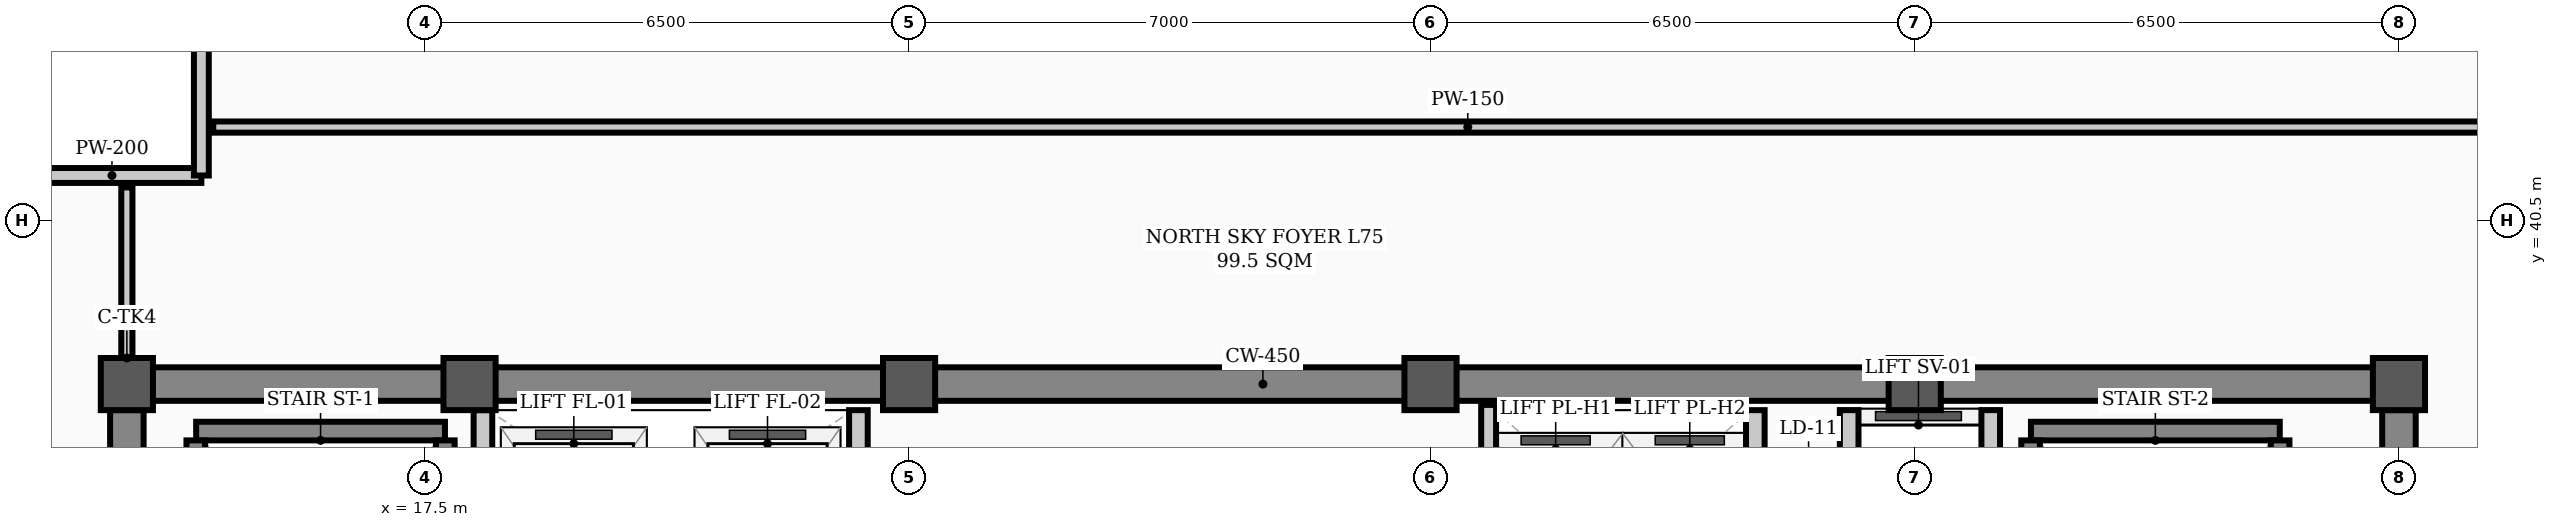
"""IFC4 building model, lengths in metres.
Left out: names, types, materials, properties, quantities, classifications, styles, units other than length and angle.
Written with IfcOpenShell. Run it as: python <this file> out.ifc"""

import sys

from ifc_helpers import new_model, si_unit, direction, frame, frame_2d, origin, origin_2d, place, context, subcontext, project, spatial, rectangle, hollow_rectangle, extrude, element, save


model = new_model("IFC4")
c1 = context("Model", 3, precision=1e-05, world=origin(), true_north=direction((0.0, 1.0)))
c2 = subcontext(c1, "Body", "Model", "MODEL_VIEW")
j1 = project(units=[si_unit("LENGTHUNIT", "METRE"), si_unit("PLANEANGLEUNIT", "RADIAN")], contexts=[c1])
p1 = place(None, origin())
s1 = spatial("IfcSite", under=j1, at=p1, CompositionType="ELEMENT")
p2 = place(p1, origin())
s2 = spatial("IfcBuilding", under=s1, at=p2, CompositionType="ELEMENT")
p3 = place(p2, frame((0.0, 0.0, 300.8)))
s3 = spatial("IfcBuildingStorey", under=s2, at=p3, CompositionType="ELEMENT", Elevation=300.8)
for number, where, z_axis, x_axis in (
    (1, (13.5, 38.3, 0.0), (0.0, 0.0, 1.0), (1.0, 0.0, 0.0)),
    (2, (18.1, 38.3, 0.0), (0.0, 0.0, 1.0), (1.0, 0.0, 0.0)),
    (3, (24.0, 38.3, 0.0), (0.0, 0.0, 1.0), (1.0, 0.0, 0.0)),
    (4, (31.0, 38.3, 0.0), (0.0, 0.0, 1.0), (1.0, 0.0, 0.0)),
    (5, (37.5, 38.3, 0.0), (0.0, 0.0, 1.0), (1.0, 0.0, 0.0)),
    (6, (44.0, 38.3, 0.0), (0.0, 0.0, 1.0), (1.0, 0.0, 0.0)),
):
    element("IfcColumn", number, at=place(p3, frame(where, z_axis=z_axis, x_axis=x_axis)), inside=s3, PredefinedType="COLUMN", context=c2, shape_type="SweptSolid", body=[
        extrude(hollow_rectangle(XDim=0.7, YDim=0.7, WallThickness=0.028, InnerFilletRadius=0.014, OuterFilletRadius=0.042, at=origin_2d()), origin(), (0.0, 0.0, 1.0), 5.2),
    ])
for number, where, z_axis, x_axis in (
    (7, (12.1, 41.1, 0.0), (0.0, 0.0, 1.0), (1.0, 0.0, 0.0)),
    (8, (14.5, 41.1, 0.0), (0.0, 0.0, 1.0), (0.0, 1.0, 0.0)),
):
    element("IfcWall", number, at=place(p3, frame(where, z_axis=z_axis, x_axis=x_axis)), inside=s3, PredefinedType="PARAPET", context=c2, shape_type="SweptSolid", body=[
        extrude(rectangle(XDim=2.4, YDim=0.2, at=frame_2d((1.2, 0.0))), origin(), (0.0, 0.0, 1.0), 1.2),
    ])
p4 = place(p3, frame((13.5, 38.3, 0.0), z_axis=(0.0, 0.0, 1.0), x_axis=(1.0, 0.0, 0.0)))
e9 = element("IfcWall", 9, at=p4, inside=s3, PredefinedType="SHEAR", context=c2, shape_type="SweptSolid", body=[
    extrude(rectangle(XDim=30.5, YDim=0.45, at=frame_2d((15.25, 0.0))), origin(), (0.0, 0.0, 1.0), 4.9),
])
for number, where, z_axis, x_axis in (
    (10, (13.5, 29.35, 0.0), (0.0, 0.0, 1.0), (0.0, 1.0, 0.0)),
    (11, (44.0, 29.35, 0.0), (0.0, 0.0, 1.0), (0.0, 1.0, 0.0)),
):
    element("IfcWall", number, at=place(p3, frame(where, z_axis=z_axis, x_axis=x_axis)), inside=s3, PredefinedType="SHEAR", context=c2, shape_type="SweptSolid", body=[
        extrude(rectangle(XDim=8.6, YDim=0.45, at=frame_2d((4.3, 0.0))), origin(), (0.0, 0.0, 1.0), 4.9),
    ])
p5 = place(p3, frame((14.43, 37.669, 0.0), z_axis=(0.0, 0.0, 1.0), x_axis=(1.0, 0.0, 0.0)))
e12 = element("IfcWall", 12, at=p5, inside=s3, PredefinedType="STANDARD", context=c2, shape_type="SweptSolid", body=[
    extrude(rectangle(XDim=3.34, YDim=0.25, at=frame_2d((1.67, 0.0))), origin(), (0.0, 0.0, 1.0), 4.9),
])
for number, where, z_axis, x_axis in (
    (13, (14.425, 30.36, 0.0), (0.0, 0.0, 1.0), (0.0, 1.0, 0.0)),
    (14, (17.775, 30.36, 0.0), (0.0, 0.0, 1.0), (0.0, 1.0, 0.0)),
):
    element("IfcWall", number, at=place(p3, frame(where, z_axis=z_axis, x_axis=x_axis)), inside=s3, PredefinedType="STANDARD", context=c2, shape_type="SweptSolid", body=[
        extrude(rectangle(XDim=7.184, YDim=0.25, at=frame_2d((3.592, 0.0))), origin(), (0.0, 0.0, 1.0), 4.9),
    ])
p6 = place(p3, frame((39.06, 37.669, 0.0), z_axis=(0.0, 0.0, 1.0), x_axis=(1.0, 0.0, 0.0)))
e15 = element("IfcWall", 15, at=p6, inside=s3, PredefinedType="STANDARD", context=c2, shape_type="SweptSolid", body=[
    extrude(rectangle(XDim=3.34, YDim=0.25, at=frame_2d((1.67, 0.0))), origin(), (0.0, 0.0, 1.0), 4.9),
])
for number, where, z_axis, x_axis in (
    (16, (39.055, 30.36, 0.0), (0.0, 0.0, 1.0), (0.0, 1.0, 0.0)),
    (17, (42.405, 30.36, 0.0), (0.0, 0.0, 1.0), (0.0, 1.0, 0.0)),
):
    element("IfcWall", number, at=place(p3, frame(where, z_axis=z_axis, x_axis=x_axis)), inside=s3, PredefinedType="STANDARD", context=c2, shape_type="SweptSolid", body=[
        extrude(rectangle(XDim=7.184, YDim=0.25, at=frame_2d((3.592, 0.0))), origin(), (0.0, 0.0, 1.0), 4.9),
    ])
p7 = place(p3, frame((36.62, 31.95, 0.0), z_axis=(0.0, 0.0, 1.0), x_axis=(0.0, 1.0, 0.0)))
e18 = element("IfcWall", 18, at=p7, inside=s3, PredefinedType="STANDARD", context=c2, shape_type="SweptSolid", body=[
    extrude(rectangle(XDim=6.0, YDim=0.25, at=frame_2d((3.0, 0.0))), origin(), (0.0, 0.0, 1.0), 3.48),
])
p8 = place(p7, frame((0.9, 0.0, 0.0)))
e19 = element("IfcOpeningElement", 19, at=p8, cuts=e18, PredefinedType="OPENING", context=c2, shape_type="SweptSolid", body=[
    extrude(rectangle(XDim=1.1, YDim=2.08, at=frame_2d((0.55, 1.04))), frame((0.0, 0.135, 0.0), z_axis=(0.0, -1.0, 0.0), x_axis=(1.0, 0.0, 0.0)), (0.0, 0.0, 1.0), 0.27),
])
p9 = place(p7, frame((4.0, 0.0, 0.0)))
e20 = element("IfcOpeningElement", 20, at=p9, cuts=e18, PredefinedType="OPENING", context=c2, shape_type="SweptSolid", body=[
    extrude(rectangle(XDim=1.1, YDim=2.08, at=frame_2d((0.55, 1.04))), frame((0.0, 0.135, 0.0), z_axis=(0.0, -1.0, 0.0), x_axis=(1.0, 0.0, 0.0)), (0.0, 0.0, 1.0), 0.27),
])
p10 = place(p3, frame((38.52, 31.95, 0.0), z_axis=(0.0, 0.0, 1.0), x_axis=(0.0, 1.0, 0.0)))
e21 = element("IfcWall", 21, at=p10, inside=s3, PredefinedType="STANDARD", context=c2, shape_type="SweptSolid", body=[
    extrude(rectangle(XDim=6.0, YDim=0.25, at=frame_2d((3.0, 0.0))), origin(), (0.0, 0.0, 1.0), 3.48),
])
for number, where, z_axis, x_axis in (
    (22, (18.28, 34.62, 0.0), (0.0, 0.0, 1.0), (0.0, 1.0, 0.0)),
    (23, (23.32, 34.62, 0.0), (0.0, 0.0, 1.0), (0.0, 1.0, 0.0)),
):
    element("IfcWall", number, at=place(p3, frame(where, z_axis=z_axis, x_axis=x_axis)), inside=s3, PredefinedType="STANDARD", context=c2, shape_type="SweptSolid", body=[
        extrude(rectangle(XDim=3.33, YDim=0.25, at=frame_2d((1.665, 0.0))), origin(), (0.0, 0.0, 1.0), 4.9),
    ])
p11 = place(p3, frame((35.36, 34.9, 0.0), z_axis=(0.0, 0.0, 1.0), x_axis=(0.0, 1.0, 0.0)))
e24 = element("IfcWall", 24, at=p11, inside=s3, PredefinedType="STANDARD", context=c2, shape_type="SweptSolid", body=[
    extrude(rectangle(XDim=3.05, YDim=0.25, at=frame_2d((1.525, 0.0))), origin(), (0.0, 0.0, 1.0), 3.48),
])
p12 = place(p3, frame((14.66, 41.75, 0.0), z_axis=(0.0, 0.0, 1.0), x_axis=(1.0, 0.0, 0.0)))
e25 = element("IfcWall", 25, at=p12, inside=s3, PredefinedType="PARTITIONING", context=c2, shape_type="SweptSolid", body=[
    extrude(rectangle(XDim=33.68, YDim=0.15, at=frame_2d((16.84, 0.0))), origin(), (0.0, 0.0, 1.0), 3.48),
])
p13 = place(p3, frame((13.5, 38.535, 0.0), z_axis=(0.0, 0.0, 1.0), x_axis=(0.0, 1.0, 0.0)))
e26 = element("IfcWall", 26, at=p13, inside=s3, PredefinedType="PARTITIONING", context=c2, shape_type="SweptSolid", body=[
    extrude(rectangle(XDim=2.405, YDim=0.15, at=frame_2d((1.203, 0.0))), origin(), (0.0, 0.0, 1.0), 4.9),
])
p14 = place(p3, frame((31.78, 34.9, 0.0), z_axis=(0.0, 0.0, 1.0), x_axis=(0.0, 1.0, 0.0)))
e27 = element("IfcWall", 27, at=p14, inside=s3, PredefinedType="STANDARD", context=c2, shape_type="SweptSolid", body=[
    extrude(rectangle(XDim=3.12, YDim=0.2, at=frame_2d((1.56, 0.0))), origin(), (0.0, 0.0, 1.0), 3.48),
])
save(model, sys.argv[1])
